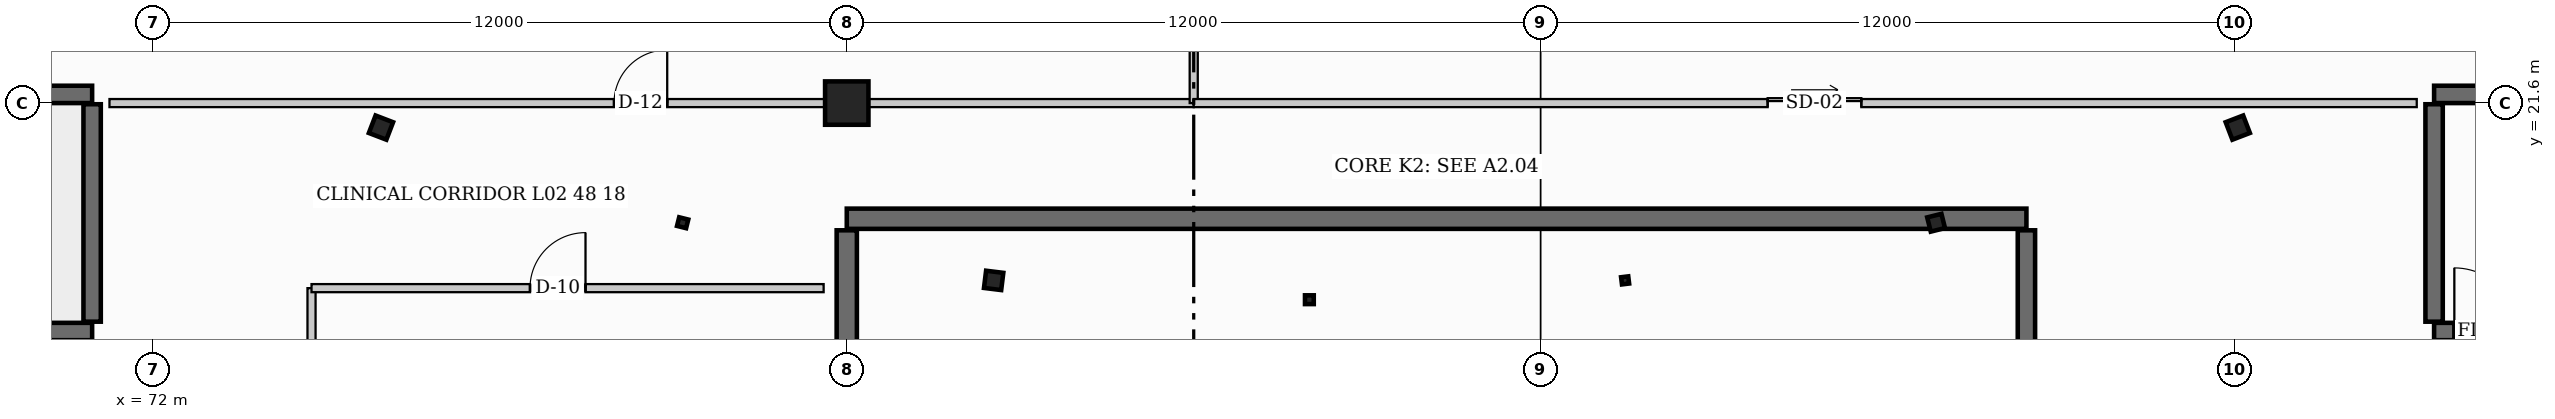
"""IFC4 building model, lengths in metres.
Left out: names, types, materials, properties, quantities, classifications, styles, units other than length and angle.
Written with IfcOpenShell. Run it as: python <this file> out.ifc"""

import sys

from ifc_helpers import new_model, si_unit, direction, frame, frame_2d, origin, origin_2d, place, context, subcontext, project, spatial, rectangle, hollow_rectangle, hollow_circle, i_section, extrude, element, fill, save


model = new_model("IFC4")
c1 = context("Model", 3, precision=1e-05, world=origin(), true_north=direction((0.0, 1.0)))
c2 = subcontext(c1, "Body", "Model", "MODEL_VIEW")
j1 = project(units=[si_unit("LENGTHUNIT", "METRE"), si_unit("PLANEANGLEUNIT", "RADIAN")], contexts=[c1])
p1 = place(None, origin())
s1 = spatial("IfcSite", under=j1, at=p1, CompositionType="ELEMENT")
p2 = place(p1, origin())
s2 = spatial("IfcBuilding", under=s1, at=p2, CompositionType="ELEMENT")
p3 = place(p2, frame((0.0, 0.0, 9.6)))
s3 = spatial("IfcBuildingStorey", under=s2, at=p3, CompositionType="ELEMENT", Elevation=9.6)
p4 = place(p3, frame((84.0, 21.6, 0.0), z_axis=(0.0, 0.0, 1.0), x_axis=(0.0, 1.0, 0.0)))
e1 = element("IfcColumn", 1, at=p4, inside=s3, PredefinedType="COLUMN", context=c2, shape_type="SweptSolid", body=[
    extrude(rectangle(XDim=0.75, YDim=0.75, at=origin_2d()), origin(), (0.0, 0.0, 1.0), 4.8),
])
p5 = place(p3, frame((75.945, 21.176, 0.0), z_axis=(0.0, 0.0, 1.0), x_axis=(0.358367949545, 0.933580426497, 0.0)))
e2 = element("IfcColumn", 2, at=p5, inside=s3, PredefinedType="COLUMN", context=c2, shape_type="SweptSolid", body=[
    extrude(hollow_circle(Radius=0.162, WallThickness=0.013, at=origin_2d()), origin(), (0.0, 0.0, 1.0), 4.8),
])
p6 = place(p3, frame((81.162, 19.531, 0.0), z_axis=(0.0, 0.0, 1.0), x_axis=(0.2419218956, 0.970295726276, 0.0)))
e3 = element("IfcColumn", 3, at=p6, inside=s3, PredefinedType="COLUMN", context=c2, shape_type="SweptSolid", body=[
    extrude(i_section(OverallWidth=0.154, OverallDepth=0.162, WebThickness=0.008, FlangeThickness=0.011, at=origin_2d()), origin(), (0.0, 0.0, 1.0), 4.8),
])
p7 = place(p3, frame((86.54, 18.534, 0.0), z_axis=(0.0, 0.0, 1.0), x_axis=(0.121869343405, 0.992546151641, 0.0)))
e4 = element("IfcColumn", 4, at=p7, inside=s3, PredefinedType="COLUMN", context=c2, shape_type="SweptSolid", body=[
    extrude(hollow_rectangle(XDim=0.3, YDim=0.3, WallThickness=0.012, at=origin_2d()), origin(), (0.0, 0.0, 1.0), 4.8),
])
p8 = place(p3, frame((92.0, 18.2, 0.0), z_axis=(0.0, 0.0, 1.0), x_axis=(0.0, 1.0, 0.0)))
e5 = element("IfcColumn", 5, at=p8, inside=s3, PredefinedType="COLUMN", context=c2, shape_type="SweptSolid", body=[
    extrude(i_section(OverallWidth=0.152, OverallDepth=0.152, WebThickness=0.006, FlangeThickness=0.007, at=origin_2d()), origin(), (0.0, 0.0, 1.0), 4.8),
])
p9 = place(p3, frame((97.46, 18.534, 0.0), z_axis=(0.0, 0.0, 1.0), x_axis=(-0.121869343405, 0.992546151641, 0.0)))
e6 = element("IfcColumn", 6, at=p9, inside=s3, PredefinedType="COLUMN", context=c2, shape_type="SweptSolid", body=[
    extrude(hollow_rectangle(XDim=0.125, YDim=0.125, WallThickness=0.006, at=origin_2d()), origin(), (0.0, 0.0, 1.0), 4.8),
])
p10 = place(p3, frame((102.838, 19.531, 0.0), z_axis=(0.0, 0.0, 1.0), x_axis=(-0.2419218956, 0.970295726276, 0.0)))
e7 = element("IfcColumn", 7, at=p10, inside=s3, PredefinedType="COLUMN", context=c2, shape_type="SweptSolid", body=[
    extrude(i_section(OverallWidth=0.254, OverallDepth=0.254, WebThickness=0.009, FlangeThickness=0.014, at=origin_2d()), origin(), (0.0, 0.0, 1.0), 4.8),
])
p11 = place(p3, frame((108.055, 21.176, 0.0), z_axis=(0.0, 0.0, 1.0), x_axis=(-0.358367949545, 0.933580426497, 0.0)))
e8 = element("IfcColumn", 8, at=p11, inside=s3, PredefinedType="COLUMN", context=c2, shape_type="SweptSolid", body=[
    extrude(hollow_circle(Radius=0.162, WallThickness=0.013, at=origin_2d()), origin(), (0.0, 0.0, 1.0), 4.8),
])
p12 = place(p3, frame((84.0, 19.6, 0.0), z_axis=(0.0, 0.0, 1.0), x_axis=(1.0, 0.0, 0.0)))
e9 = element("IfcWall", 9, at=p12, inside=s3, PredefinedType="SHEAR", context=c2, shape_type="SweptSolid", body=[
    extrude(rectangle(XDim=20.4, YDim=0.35, at=frame_2d((10.2, 0.0))), origin(), (0.0, 0.0, 1.0), 4.8),
])
p13 = place(p3, frame((84.0, 8.8, 0.0), z_axis=(0.0, 0.0, 1.0), x_axis=(0.0, 1.0, 0.0)))
e10 = element("IfcWall", 10, at=p13, inside=s3, PredefinedType="SHEAR", context=c2, shape_type="SweptSolid", body=[
    extrude(rectangle(XDim=10.6, YDim=0.35, at=frame_2d((5.3, 0.0))), origin(), (0.0, 0.0, 1.0), 4.8),
])
p14 = place(p3, frame((104.4, 19.4, 0.0), z_axis=(0.0, 0.0, 1.0), x_axis=(0.0, -1.0, 0.0)))
e11 = element("IfcWall", 11, at=p14, inside=s3, PredefinedType="SHEAR", context=c2, shape_type="SweptSolid", body=[
    extrude(rectangle(XDim=10.6, YDim=0.3, at=frame_2d((5.3, 0.0))), origin(), (0.0, 0.0, 1.0), 4.8),
])
p15 = place(p3, frame((62.25, 17.65, 0.0), z_axis=(0.0, 0.0, 1.0), x_axis=(1.0, 0.0, 0.0)))
e12 = element("IfcWall", 12, at=p15, inside=s3, PredefinedType="SHEAR", context=c2, shape_type="SweptSolid", body=[
    extrude(rectangle(XDim=8.7, YDim=0.3, at=frame_2d((4.35, 0.0))), origin(), (0.0, 0.0, 1.0), 4.8),
])
p16 = place(p15, frame((0.35, 0.0, 0.0)))
e13 = element("IfcOpeningElement", 13, at=p16, cuts=e12, PredefinedType="OPENING", context=c2, shape_type="SweptSolid", body=[
    extrude(rectangle(XDim=1.1, YDim=2.15, at=frame_2d((0.55, 1.075))), frame((0.0, 0.16, 0.0), z_axis=(0.0, -1.0, 0.0), x_axis=(1.0, 0.0, 0.0)), (0.0, 0.0, 1.0), 0.32),
])
p17 = place(p3, frame((70.95, 21.75, 0.0), z_axis=(0.0, 0.0, 1.0), x_axis=(-1.0, 0.0, 0.0)))
e14 = element("IfcWall", 14, at=p17, inside=s3, PredefinedType="SHEAR", context=c2, shape_type="SweptSolid", body=[
    extrude(rectangle(XDim=8.7, YDim=0.3, at=frame_2d((4.35, 0.0))), origin(), (0.0, 0.0, 1.0), 4.8),
])
p18 = place(p3, frame((70.95, 17.82, 0.0), z_axis=(0.0, 0.0, 1.0), x_axis=(0.0, 1.0, 0.0)))
e15 = element("IfcWall", 15, at=p18, inside=s3, PredefinedType="SHEAR", context=c2, shape_type="SweptSolid", body=[
    extrude(rectangle(XDim=3.76, YDim=0.3, at=frame_2d((1.88, 0.0))), origin(), (0.0, 0.0, 1.0), 4.8),
])
p19 = place(p3, frame((111.45, 17.65, 0.0), z_axis=(0.0, 0.0, 1.0), x_axis=(1.0, 0.0, 0.0)))
e16 = element("IfcWall", 16, at=p19, inside=s3, PredefinedType="SHEAR", context=c2, shape_type="SweptSolid", body=[
    extrude(rectangle(XDim=8.7, YDim=0.3, at=frame_2d((4.35, 0.0))), origin(), (0.0, 0.0, 1.0), 4.8),
])
p20 = place(p19, frame((0.35, 0.0, 0.0)))
e17 = element("IfcOpeningElement", 17, at=p20, cuts=e16, PredefinedType="OPENING", context=c2, shape_type="SweptSolid", body=[
    extrude(rectangle(XDim=1.1, YDim=2.15, at=frame_2d((0.55, 1.075))), frame((0.0, 0.16, 0.0), z_axis=(0.0, -1.0, 0.0), x_axis=(1.0, 0.0, 0.0)), (0.0, 0.0, 1.0), 0.32),
])
p21 = place(p3, frame((120.15, 21.75, 0.0), z_axis=(0.0, 0.0, 1.0), x_axis=(-1.0, 0.0, 0.0)))
e18 = element("IfcWall", 18, at=p21, inside=s3, PredefinedType="SHEAR", context=c2, shape_type="SweptSolid", body=[
    extrude(rectangle(XDim=8.7, YDim=0.3, at=frame_2d((4.35, 0.0))), origin(), (0.0, 0.0, 1.0), 4.8),
])
p22 = place(p3, frame((111.45, 17.82, 0.0), z_axis=(0.0, 0.0, 1.0), x_axis=(0.0, 1.0, 0.0)))
e19 = element("IfcWall", 19, at=p22, inside=s3, PredefinedType="SHEAR", context=c2, shape_type="SweptSolid", body=[
    extrude(rectangle(XDim=3.76, YDim=0.3, at=frame_2d((1.88, 0.0))), origin(), (0.0, 0.0, 1.0), 4.8),
])
p23 = place(p3, frame((74.744, 0.3, 0.0), z_axis=(0.0, 0.0, 1.0), x_axis=(0.0, 1.0, 0.0)))
e20 = element("IfcWall", 20, at=p23, inside=s3, PredefinedType="PARTITIONING", context=c2, shape_type="SweptSolid", body=[
    extrude(rectangle(XDim=18.1, YDim=0.14, at=frame_2d((9.05, 0.0))), origin(), (0.0, 0.0, 1.0), 3.803),
])
p24 = place(p3, frame((74.744, 18.4, 0.0), z_axis=(0.0, 0.0, 1.0), x_axis=(1.0, 0.0, 0.0)))
e21 = element("IfcWall", 21, at=p24, inside=s3, PredefinedType="PARTITIONING", context=c2, shape_type="SweptSolid", body=[
    extrude(rectangle(XDim=8.856, YDim=0.14, at=frame_2d((4.428, 0.0))), origin(), (0.0, 0.0, 1.0), 3.803),
])
p25 = place(p24, frame((3.778, 0.0, 0.0)))
e22 = element("IfcOpeningElement", 22, at=p25, cuts=e21, PredefinedType="OPENING", context=c2, shape_type="SweptSolid", body=[
    extrude(rectangle(XDim=0.96, YDim=2.06, at=frame_2d((0.48, 1.03))), frame((0.0, 0.08, 0.0), z_axis=(0.0, -1.0, 0.0), x_axis=(1.0, 0.0, 0.0)), (0.0, 0.0, 1.0), 0.16),
])
p26 = place(p3, frame((71.25, 21.6, 0.0), z_axis=(0.0, 0.0, 1.0), x_axis=(1.0, 0.0, 0.0)))
e23 = element("IfcWall", 23, at=p26, inside=s3, PredefinedType="PARTITIONING", context=c2, shape_type="SweptSolid", body=[
    extrude(rectangle(XDim=18.75, YDim=0.14, at=frame_2d((9.375, 0.0))), origin(), (0.0, 0.0, 1.0), 3.515),
])
p27 = place(p26, frame((8.725, 0.0, 0.0)))
e24 = element("IfcOpeningElement", 24, at=p27, cuts=e23, PredefinedType="OPENING", context=c2, shape_type="SweptSolid", body=[
    extrude(rectangle(XDim=0.92, YDim=2.04, at=frame_2d((0.46, 1.02))), frame((0.0, 0.08, 0.0), z_axis=(0.0, -1.0, 0.0), x_axis=(1.0, 0.0, 0.0)), (0.0, 0.0, 1.0), 0.16),
])
p28 = place(p3, frame((90.0, 21.6, 0.0), z_axis=(0.0, 0.0, 1.0), x_axis=(0.0, 1.0, 0.0)))
e25 = element("IfcWall", 25, at=p28, inside=s3, PredefinedType="PARTITIONING", context=c2, shape_type="SweptSolid", body=[
    extrude(rectangle(XDim=23.7, YDim=0.14, at=frame_2d((11.85, 0.0))), origin(), (0.0, 0.0, 1.0), 3.835),
])
p29 = place(p3, frame((90.0, 21.6, 0.0), z_axis=(0.0, 0.0, 1.0), x_axis=(1.0, 0.0, 0.0)))
e26 = element("IfcWall", 26, at=p29, inside=s3, PredefinedType="PARTITIONING", context=c2, shape_type="SweptSolid", body=[
    extrude(rectangle(XDim=21.15, YDim=0.14, at=frame_2d((10.575, 0.0))), origin(), (0.0, 0.0, 1.0), 4.012),
])
p30 = place(p29, frame((9.925, 0.0, 0.0)))
e27 = element("IfcOpeningElement", 27, at=p30, cuts=e26, PredefinedType="OPENING", context=c2, shape_type="SweptSolid", body=[
    extrude(rectangle(XDim=1.62, YDim=2.3, at=frame_2d((0.81, 1.15))), frame((0.0, 0.08, 0.0), z_axis=(0.0, -1.0, 0.0), x_axis=(1.0, 0.0, 0.0)), (0.0, 0.0, 1.0), 0.16),
])
p31 = place(p20, origin())
e28 = element("IfcDoor", 28, at=p31, inside=s3, OperationType="SINGLE_SWING_LEFT", PredefinedType="DOOR", context=c2, shape_type="SweptSolid", body=[
    extrude(rectangle(XDim=1.1, YDim=2.15, at=frame_2d((0.55, 1.075))), frame((0.0, 0.025, 0.0), z_axis=(0.0, -1.0, 0.0), x_axis=(1.0, 0.0, 0.0)), (0.0, 0.0, 1.0), 0.05),
])
fill(e17, e28)
p32 = place(p25, origin())
e29 = element("IfcDoor", 29, at=p32, inside=s3, OperationType="SINGLE_SWING_RIGHT", PredefinedType="DOOR", context=c2, shape_type="SweptSolid", body=[
    extrude(rectangle(XDim=0.96, YDim=2.06, at=frame_2d((0.48, 1.03))), frame((0.0, 0.025, 0.0), z_axis=(0.0, -1.0, 0.0), x_axis=(1.0, 0.0, 0.0)), (0.0, 0.0, 1.0), 0.05),
])
fill(e22, e29)
p33 = place(p27, origin())
e30 = element("IfcDoor", 30, at=p33, inside=s3, OperationType="SINGLE_SWING_RIGHT", PredefinedType="DOOR", context=c2, shape_type="SweptSolid", body=[
    extrude(rectangle(XDim=0.92, YDim=2.04, at=frame_2d((0.46, 1.02))), frame((0.0, 0.025, 0.0), z_axis=(0.0, -1.0, 0.0), x_axis=(1.0, 0.0, 0.0)), (0.0, 0.0, 1.0), 0.05),
])
fill(e24, e30)
p34 = place(p30, origin())
e31 = element("IfcDoor", 31, at=p34, inside=s3, OperationType="SLIDING_TO_RIGHT", PredefinedType="DOOR", context=c2, shape_type="SweptSolid", body=[
    extrude(rectangle(XDim=1.62, YDim=2.3, at=frame_2d((0.81, 1.15))), frame((0.0, 0.025, 0.0), z_axis=(0.0, -1.0, 0.0), x_axis=(1.0, 0.0, 0.0)), (0.0, 0.0, 1.0), 0.05),
])
fill(e27, e31)
save(model, sys.argv[1])
